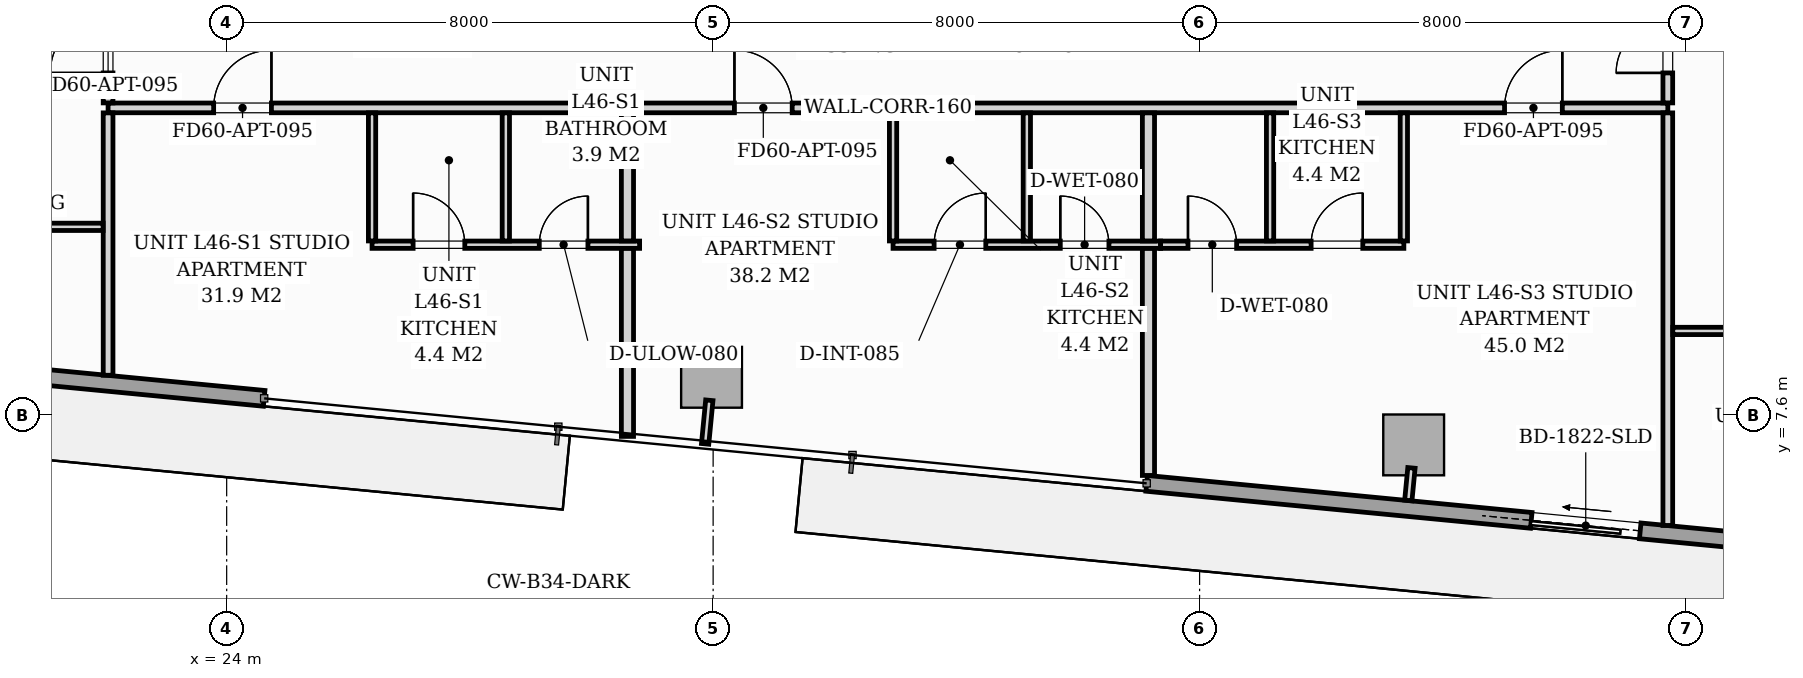
"""IFC4 building model, lengths in metres.
Left out: names, types, materials, properties, quantities, classifications, styles, units other than length and angle.
Written with IfcOpenShell. Run it as: python <this file> out.ifc"""

import sys

from ifc_helpers import new_model, si_unit, direction, frame, frame_2d, origin, origin_2d, place, context, subcontext, project, spatial, rectangle, extrude, source, transform, mapped, element, fill, save


model = new_model("IFC4")
c1 = context("Model", 3, precision=1e-05, world=origin(), true_north=direction((0.0, 1.0)))
c2 = subcontext(c1, "Body", "Model", "MODEL_VIEW")
j1 = project(units=[si_unit("LENGTHUNIT", "METRE"), si_unit("PLANEANGLEUNIT", "RADIAN")], contexts=[c1])
p1 = place(None, origin())
s1 = spatial("IfcSite", under=j1, at=p1, CompositionType="ELEMENT")
p2 = place(p1, origin())
s2 = spatial("IfcBuilding", under=s1, at=p2, CompositionType="ELEMENT")
p3 = place(p2, frame((0.0, 0.0, 159.8)))
s3 = spatial("IfcBuildingStorey", under=s2, at=p3, CompositionType="ELEMENT", Elevation=159.8)
m1 = source(origin(), c2, "Body", "SweptSolid", [
    extrude(rectangle(XDim=1.0, YDim=1.0, at=origin_2d()), origin(), (0.0, 0.0, 1.0), 3.194),
])
for number, where, z_axis, x_axis in (
    (1, (31.974, 8.22, 0.002), (0.0, 0.0, 1.0), (0.995, -0.096, 0.0)),
    (2, (43.521, 7.108, 0.002), (0.0, 0.0, 1.0), (0.995, -0.096, 0.0)),
):
    element("IfcColumn", number, at=place(p3, frame(where, z_axis=z_axis, x_axis=x_axis)), inside=s3, PredefinedType="COLUMN", context=c2, shape_type="MappedRepresentation", body=[
        mapped(m1, transform((0.0, 0.0, 0.0), scale=1.0)),
    ])
p4 = place(p3, frame((56.061, 4.845, 0.0), z_axis=(0.0, 0.0, 1.0), x_axis=(-0.995395976631, 0.095848055311, 0.0)))
e3 = element("IfcWall", 3, at=p4, inside=s3, PredefinedType="STANDARD", context=c2, shape_type="SweptSolid", body=[
    extrude(rectangle(XDim=17.01, YDim=0.26, at=frame_2d((8.505, 0.0))), origin(), (0.0, 0.0, 1.0), 2.9),
])
p5 = place(p4, frame((8.856, 0.0, 0.0)))
e4 = element("IfcOpeningElement", 4, at=p5, cuts=e3, PredefinedType="OPENING", context=c2, shape_type="SweptSolid", body=[
    extrude(rectangle(XDim=1.8, YDim=2.06, at=frame_2d((0.9, 1.03))), frame((0.0, 0.14, 0.0), z_axis=(0.0, -1.0, 0.0), x_axis=(1.0, 0.0, 0.0)), (0.0, 0.0, 1.0), 0.28),
])
p6 = place(p4, frame((2.05, 0.0, 0.65)))
e5 = element("IfcOpeningElement", 5, at=p6, cuts=e3, PredefinedType="OPENING", context=c2, shape_type="SweptSolid", body=[
    extrude(rectangle(XDim=1.6, YDim=1.5, at=frame_2d((0.8, 0.75))), frame((0.0, 0.14, 0.0), z_axis=(0.0, -1.0, 0.0), x_axis=(1.0, 0.0, 0.0)), (0.0, 0.0, 1.0), 0.28),
])
p7 = place(p3, frame((24.617, 7.873, 0.0), z_axis=(0.0, 0.0, 1.0), x_axis=(-0.995395976631, 0.095848055311, 0.0)))
e6 = element("IfcWall", 6, at=p7, inside=s3, PredefinedType="STANDARD", context=c2, shape_type="SweptSolid", body=[
    extrude(rectangle(XDim=17.01, YDim=0.26, at=frame_2d((8.505, 0.0))), origin(), (0.0, 0.0, 1.0), 2.9),
])
p8 = place(p7, frame((7.07, 0.0, 0.0)))
e7 = element("IfcOpeningElement", 7, at=p8, cuts=e6, PredefinedType="OPENING", context=c2, shape_type="SweptSolid", body=[
    extrude(rectangle(XDim=1.8, YDim=2.06, at=frame_2d((0.9, 1.03))), frame((0.0, 0.14, 0.0), z_axis=(0.0, -1.0, 0.0), x_axis=(1.0, 0.0, 0.0)), (0.0, 0.0, 1.0), 0.28),
])
p9 = place(p7, frame((9.7, 0.0, 0.65)))
e8 = element("IfcOpeningElement", 8, at=p9, cuts=e6, PredefinedType="OPENING", context=c2, shape_type="SweptSolid", body=[
    extrude(rectangle(XDim=1.6, YDim=1.5, at=frame_2d((0.8, 0.75))), frame((0.0, 0.14, 0.0), z_axis=(0.0, -1.0, 0.0), x_axis=(1.0, 0.0, 0.0)), (0.0, 0.0, 1.0), 0.28),
])
p10 = place(p3, frame((22.05, 12.65, 0.0), z_axis=(0.0, 0.0, 1.0), x_axis=(1.0, 0.0, 0.0)))
e9 = element("IfcWall", 9, at=p10, inside=s3, PredefinedType="PARTITIONING", context=c2, shape_type="SweptSolid", body=[
    extrude(rectangle(XDim=25.65, YDim=0.16, at=frame_2d((12.825, 0.0))), origin(), (0.0, 0.0, 1.0), 2.9),
])
p11 = place(p10, frame((1.736, 0.0, 0.0)))
e10 = element("IfcOpeningElement", 10, at=p11, cuts=e9, PredefinedType="OPENING", context=c2, shape_type="SweptSolid", body=[
    extrude(rectangle(XDim=0.95, YDim=2.06, at=frame_2d((0.475, 1.03))), frame((0.0, 0.09, 0.0), z_axis=(0.0, -1.0, 0.0), x_axis=(1.0, 0.0, 0.0)), (0.0, 0.0, 1.0), 0.18),
])
p12 = place(p10, frame((10.3, 0.0, 0.0)))
e11 = element("IfcOpeningElement", 11, at=p12, cuts=e9, PredefinedType="OPENING", context=c2, shape_type="SweptSolid", body=[
    extrude(rectangle(XDim=0.95, YDim=2.06, at=frame_2d((0.475, 1.03))), frame((0.0, 0.09, 0.0), z_axis=(0.0, -1.0, 0.0), x_axis=(1.0, 0.0, 0.0)), (0.0, 0.0, 1.0), 0.18),
])
p13 = place(p10, frame((22.965, 0.0, 0.0)))
e12 = element("IfcOpeningElement", 12, at=p13, cuts=e9, PredefinedType="OPENING", context=c2, shape_type="SweptSolid", body=[
    extrude(rectangle(XDim=0.95, YDim=2.06, at=frame_2d((0.475, 1.03))), frame((0.0, 0.09, 0.0), z_axis=(0.0, -1.0, 0.0), x_axis=(1.0, 0.0, 0.0)), (0.0, 0.0, 1.0), 0.18),
])
p14 = place(p3, frame((22.05, 8.253, 0.0), z_axis=(0.0, 0.0, 1.0), x_axis=(0.0, 1.0, 0.0)))
e13 = element("IfcWall", 13, at=p14, inside=s3, PredefinedType="PARTITIONING", context=c2, shape_type="SweptSolid", body=[
    extrude(rectangle(XDim=4.315, YDim=0.16, at=frame_2d((2.157, 0.0))), origin(), (0.0, 0.0, 1.0), 2.9),
])
p15 = place(p3, frame((22.05, 12.732, 0.0), z_axis=(0.0, 0.0, 1.0), x_axis=(0.0, 1.0, 0.0)))
e14 = element("IfcWall", 14, at=p15, inside=s3, PredefinedType="PARTITIONING", context=c2, shape_type="SweptSolid", body=[
    extrude(rectangle(XDim=14.685, YDim=0.16, at=frame_2d((7.343, 0.0))), origin(), (0.0, 0.0, 1.0), 2.9),
])
p16 = place(p15, frame((0.493, 0.0, 0.0)))
e15 = element("IfcOpeningElement", 15, at=p16, cuts=e14, PredefinedType="OPENING", context=c2, shape_type="SweptSolid", body=[
    extrude(rectangle(XDim=0.95, YDim=2.06, at=frame_2d((0.475, 1.03))), frame((0.0, 0.09, 0.0), z_axis=(0.0, -1.0, 0.0), x_axis=(1.0, 0.0, 0.0)), (0.0, 0.0, 1.0), 0.18),
])
p17 = place(p15, frame((6.085, 0.0, 0.0)))
e16 = element("IfcOpeningElement", 16, at=p17, cuts=e14, PredefinedType="OPENING", context=c2, shape_type="SweptSolid", body=[
    extrude(rectangle(XDim=0.95, YDim=2.06, at=frame_2d((0.475, 1.03))), frame((0.0, 0.09, 0.0), z_axis=(0.0, -1.0, 0.0), x_axis=(1.0, 0.0, 0.0)), (0.0, 0.0, 1.0), 0.18),
])
p18 = place(p3, frame((47.7, 5.783, 0.0), z_axis=(0.0, 0.0, 1.0), x_axis=(0.0, 1.0, 0.0)))
e17 = element("IfcWall", 17, at=p18, inside=s3, PredefinedType="PARTITIONING", context=c2, shape_type="SweptSolid", body=[
    extrude(rectangle(XDim=6.785, YDim=0.16, at=frame_2d((3.393, 0.0))), origin(), (0.0, 0.0, 1.0), 2.9),
])
p19 = place(p3, frame((47.7, 12.732, 0.0), z_axis=(0.0, 0.0, 1.0), x_axis=(0.0, 1.0, 0.0)))
e18 = element("IfcWall", 18, at=p19, inside=s3, PredefinedType="PARTITIONING", context=c2, shape_type="SweptSolid", body=[
    extrude(rectangle(XDim=7.918, YDim=0.16, at=frame_2d((3.959, 0.0))), origin(), (0.0, 0.0, 1.0), 2.9),
])
p20 = place(p19, frame((0.493, 0.0, 0.0)))
e19 = element("IfcOpeningElement", 19, at=p20, cuts=e18, PredefinedType="OPENING", context=c2, shape_type="SweptSolid", body=[
    extrude(rectangle(XDim=0.85, YDim=2.0, at=frame_2d((0.425, 1.0))), frame((0.0, 0.09, 0.0), z_axis=(0.0, -1.0, 0.0), x_axis=(1.0, 0.0, 0.0)), (0.0, 0.0, 1.0), 0.18),
])
p21 = place(p19, frame((6.311, 0.0, 0.0)))
e20 = element("IfcOpeningElement", 20, at=p21, cuts=e18, PredefinedType="OPENING", context=c2, shape_type="SweptSolid", body=[
    extrude(rectangle(XDim=0.95, YDim=2.06, at=frame_2d((0.475, 1.03))), frame((0.0, 0.09, 0.0), z_axis=(0.0, -1.0, 0.0), x_axis=(1.0, 0.0, 0.0)), (0.0, 0.0, 1.0), 0.18),
])
p22 = place(p3, frame((26.391, 10.4, 0.0), z_axis=(0.0, 0.0, 1.0), x_axis=(1.0, 0.0, 0.0)))
e21 = element("IfcWall", 21, at=p22, inside=s3, PredefinedType="PARTITIONING", context=c2, shape_type="SweptSolid", body=[
    extrude(rectangle(XDim=4.4, YDim=0.12, at=frame_2d((2.2, 0.0))), origin(), (0.0, 0.0, 1.0), 2.9),
])
p23 = place(p22, frame((0.675, 0.0, 0.0)))
e22 = element("IfcOpeningElement", 22, at=p23, cuts=e21, PredefinedType="OPENING", context=c2, shape_type="SweptSolid", body=[
    extrude(rectangle(XDim=0.85, YDim=2.05, at=frame_2d((0.425, 1.025))), frame((0.0, 0.07, 0.0), z_axis=(0.0, -1.0, 0.0), x_axis=(1.0, 0.0, 0.0)), (0.0, 0.0, 1.0), 0.14),
])
p24 = place(p22, frame((2.75, 0.0, 0.0)))
e23 = element("IfcOpeningElement", 23, at=p24, cuts=e21, PredefinedType="OPENING", context=c2, shape_type="SweptSolid", body=[
    extrude(rectangle(XDim=0.8, YDim=2.0, at=frame_2d((0.4, 1.0))), frame((0.0, 0.07, 0.0), z_axis=(0.0, -1.0, 0.0), x_axis=(1.0, 0.0, 0.0)), (0.0, 0.0, 1.0), 0.14),
])
for number, where, z_axis, x_axis in (
    (24, (26.391, 10.462, 0.0), (0.0, 0.0, 1.0), (0.0, 1.0, 0.0)),
    (25, (28.591, 10.462, 0.0), (0.0, 0.0, 1.0), (0.0, 1.0, 0.0)),
):
    element("IfcWall", number, at=place(p3, frame(where, z_axis=z_axis, x_axis=x_axis)), inside=s3, PredefinedType="PARTITIONING", context=c2, shape_type="SweptSolid", body=[
        extrude(rectangle(XDim=2.106, YDim=0.12, at=frame_2d((1.053, 0.0))), origin(), (0.0, 0.0, 1.0), 2.9),
    ])
p25 = place(p3, frame((30.591, 7.248, 0.0), z_axis=(0.0, 0.0, 1.0), x_axis=(0.0, 1.0, 0.0)))
e26 = element("IfcWall", 26, at=p25, inside=s3, PredefinedType="PARTITIONING", context=c2, shape_type="SweptSolid", body=[
    extrude(rectangle(XDim=3.09, YDim=0.2, at=frame_2d((1.545, 0.0))), origin(), (0.0, 0.0, 1.0), 2.9),
])
p26 = place(p3, frame((30.591, 10.462, 0.0), z_axis=(0.0, 0.0, 1.0), x_axis=(0.0, 1.0, 0.0)))
e27 = element("IfcWall", 27, at=p26, inside=s3, PredefinedType="PARTITIONING", context=c2, shape_type="SweptSolid", body=[
    extrude(rectangle(XDim=2.106, YDim=0.2, at=frame_2d((1.053, 0.0))), origin(), (0.0, 0.0, 1.0), 2.9),
])
p27 = place(p3, frame((34.959, 10.4, 0.0), z_axis=(0.0, 0.0, 1.0), x_axis=(1.0, 0.0, 0.0)))
e28 = element("IfcWall", 28, at=p27, inside=s3, PredefinedType="PARTITIONING", context=c2, shape_type="SweptSolid", body=[
    extrude(rectangle(XDim=4.4, YDim=0.12, at=frame_2d((2.2, 0.0))), origin(), (0.0, 0.0, 1.0), 2.9),
])
p28 = place(p27, frame((0.675, 0.0, 0.0)))
e29 = element("IfcOpeningElement", 29, at=p28, cuts=e28, PredefinedType="OPENING", context=c2, shape_type="SweptSolid", body=[
    extrude(rectangle(XDim=0.85, YDim=2.05, at=frame_2d((0.425, 1.025))), frame((0.0, 0.07, 0.0), z_axis=(0.0, -1.0, 0.0), x_axis=(1.0, 0.0, 0.0)), (0.0, 0.0, 1.0), 0.14),
])
p29 = place(p27, frame((2.75, 0.0, 0.0)))
e30 = element("IfcOpeningElement", 30, at=p29, cuts=e28, PredefinedType="OPENING", context=c2, shape_type="SweptSolid", body=[
    extrude(rectangle(XDim=0.8, YDim=2.02, at=frame_2d((0.4, 1.01))), frame((0.0, 0.07, 0.0), z_axis=(0.0, -1.0, 0.0), x_axis=(1.0, 0.0, 0.0)), (0.0, 0.0, 1.0), 0.14),
])
for number, where, z_axis, x_axis in (
    (31, (34.959, 10.462, 0.0), (0.0, 0.0, 1.0), (0.0, 1.0, 0.0)),
    (32, (37.159, 10.462, 0.0), (0.0, 0.0, 1.0), (0.0, 1.0, 0.0)),
):
    element("IfcWall", number, at=place(p3, frame(where, z_axis=z_axis, x_axis=x_axis)), inside=s3, PredefinedType="PARTITIONING", context=c2, shape_type="SweptSolid", body=[
        extrude(rectangle(XDim=2.106, YDim=0.12, at=frame_2d((1.053, 0.0))), origin(), (0.0, 0.0, 1.0), 2.9),
    ])
p30 = place(p3, frame((39.159, 6.606, 0.0), z_axis=(0.0, 0.0, 1.0), x_axis=(0.0, 1.0, 0.0)))
e33 = element("IfcWall", 33, at=p30, inside=s3, PredefinedType="PARTITIONING", context=c2, shape_type="SweptSolid", body=[
    extrude(rectangle(XDim=3.732, YDim=0.2, at=frame_2d((1.866, 0.0))), origin(), (0.0, 0.0, 1.0), 2.9),
])
p31 = place(p3, frame((39.159, 10.462, 0.0), z_axis=(0.0, 0.0, 1.0), x_axis=(0.0, 1.0, 0.0)))
e34 = element("IfcWall", 34, at=p31, inside=s3, PredefinedType="PARTITIONING", context=c2, shape_type="SweptSolid", body=[
    extrude(rectangle(XDim=2.106, YDim=0.2, at=frame_2d((1.053, 0.0))), origin(), (0.0, 0.0, 1.0), 2.9),
])
p32 = place(p3, frame((39.359, 10.4, 0.0), z_axis=(0.0, 0.0, 1.0), x_axis=(1.0, 0.0, 0.0)))
e35 = element("IfcWall", 35, at=p32, inside=s3, PredefinedType="PARTITIONING", context=c2, shape_type="SweptSolid", body=[
    extrude(rectangle(XDim=4.0, YDim=0.12, at=frame_2d((2.0, 0.0))), origin(), (0.0, 0.0, 1.0), 2.9),
])
p33 = place(p32, frame((0.45, 0.0, 0.0)))
e36 = element("IfcOpeningElement", 36, at=p33, cuts=e35, PredefinedType="OPENING", context=c2, shape_type="SweptSolid", body=[
    extrude(rectangle(XDim=0.8, YDim=2.02, at=frame_2d((0.4, 1.01))), frame((0.0, 0.07, 0.0), z_axis=(0.0, -1.0, 0.0), x_axis=(1.0, 0.0, 0.0)), (0.0, 0.0, 1.0), 0.14),
])
p34 = place(p32, frame((2.475, 0.0, 0.0)))
e37 = element("IfcOpeningElement", 37, at=p34, cuts=e35, PredefinedType="OPENING", context=c2, shape_type="SweptSolid", body=[
    extrude(rectangle(XDim=0.85, YDim=2.05, at=frame_2d((0.425, 1.025))), frame((0.0, 0.07, 0.0), z_axis=(0.0, -1.0, 0.0), x_axis=(1.0, 0.0, 0.0)), (0.0, 0.0, 1.0), 0.14),
])
for number, where, z_axis, x_axis in (
    (38, (43.359, 10.462, 0.0), (0.0, 0.0, 1.0), (0.0, 1.0, 0.0)),
    (39, (41.159, 10.462, 0.0), (0.0, 0.0, 1.0), (0.0, 1.0, 0.0)),
):
    element("IfcWall", number, at=place(p3, frame(where, z_axis=z_axis, x_axis=x_axis)), inside=s3, PredefinedType="PARTITIONING", context=c2, shape_type="SweptSolid", body=[
        extrude(rectangle(XDim=2.106, YDim=0.12, at=frame_2d((1.053, 0.0))), origin(), (0.0, 0.0, 1.0), 2.9),
    ])
p35 = place(p3, frame((8.751, 10.694, 0.0), z_axis=(0.0, 0.0, 1.0), x_axis=(1.0, 0.0, 0.0)))
e40 = element("IfcWall", 40, at=p35, inside=s3, PredefinedType="PARTITIONING", context=c2, shape_type="SweptSolid", body=[
    extrude(rectangle(XDim=13.217, YDim=0.12, at=frame_2d((6.608, 0.0))), origin(), (0.0, 0.0, 1.0), 2.9),
])
p36 = place(p35, frame((6.184, 0.0, 0.0)))
e41 = element("IfcOpeningElement", 41, at=p36, cuts=e40, PredefinedType="OPENING", context=c2, shape_type="SweptSolid", body=[
    extrude(rectangle(XDim=0.85, YDim=2.05, at=frame_2d((0.425, 1.025))), frame((0.0, 0.07, 0.0), z_axis=(0.0, -1.0, 0.0), x_axis=(1.0, 0.0, 0.0)), (0.0, 0.0, 1.0), 0.14),
])
p37 = place(p3, frame((47.782, 8.982, 0.0), z_axis=(0.0, 0.0, 1.0), x_axis=(1.0, 0.0, 0.0)))
e42 = element("IfcWall", 42, at=p37, inside=s3, PredefinedType="PARTITIONING", context=c2, shape_type="SweptSolid", body=[
    extrude(rectangle(XDim=8.788, YDim=0.12, at=frame_2d((4.394, 0.0))), origin(), (0.0, 0.0, 1.0), 2.9),
])
p38 = place(p37, frame((3.969, 0.0, 0.0)))
e43 = element("IfcOpeningElement", 43, at=p38, cuts=e42, PredefinedType="OPENING", context=c2, shape_type="SweptSolid", body=[
    extrude(rectangle(XDim=0.85, YDim=2.05, at=frame_2d((0.425, 1.025))), frame((0.0, 0.07, 0.0), z_axis=(0.0, -1.0, 0.0), x_axis=(1.0, 0.0, 0.0)), (0.0, 0.0, 1.0), 0.14),
])
p39 = place(p3, frame((31.938, 7.841, 0.0), z_axis=(0.0, 0.0, 1.0), x_axis=(-0.095977354523, -0.995383517755, 0.0)))
e44 = element("IfcWall", 44, at=p39, inside=s3, PredefinedType="PARTITIONING", context=c2, shape_type="SweptSolid", body=[
    extrude(rectangle(XDim=0.72, YDim=0.12, at=frame_2d((0.36, 0.0))), origin(), (0.0, 0.0, 1.0), 2.9),
])
p40 = place(p3, frame((43.484, 6.729, 0.0), z_axis=(0.0, 0.0, 1.0), x_axis=(-0.095772948675, -0.995403205893, 0.0)))
e45 = element("IfcWall", 45, at=p40, inside=s3, PredefinedType="PARTITIONING", context=c2, shape_type="SweptSolid", body=[
    extrude(rectangle(XDim=0.538, YDim=0.12, at=frame_2d((0.269, 0.0))), origin(), (0.0, 0.0, 1.0), 2.9),
])
m2 = source(origin(), c2, "Body", "SweptSolid", [
    extrude(rectangle(XDim=1.8, YDim=2.06, at=frame_2d((0.9, 1.03))), frame((0.0, 0.025, 0.0), z_axis=(0.0, -1.0, 0.0), x_axis=(1.0, 0.0, 0.0)), (0.0, 0.0, 1.0), 0.05),
])
p41 = place(p5, origin())
e46 = element("IfcDoor", 46, at=p41, inside=s3, OperationType="SLIDING_TO_RIGHT", PredefinedType="DOOR", context=c2, shape_type="MappedRepresentation", body=[
    mapped(m2, transform((0.0, 0.0, 0.0), scale=1.0)),
])
fill(e4, e46)
m3 = source(origin(), c2, "Body", "SweptSolid", [
    extrude(rectangle(XDim=0.95, YDim=2.06, at=frame_2d((0.475, 1.03))), frame((0.0, 0.025, 0.0), z_axis=(0.0, -1.0, 0.0), x_axis=(1.0, 0.0, 0.0)), (0.0, 0.0, 1.0), 0.05),
])
p42 = place(p11, origin())
e47 = element("IfcDoor", 47, at=p42, inside=s3, OperationType="SINGLE_SWING_RIGHT", PredefinedType="DOOR", context=c2, shape_type="MappedRepresentation", body=[
    mapped(m3, transform((0.0, 0.0, 0.0), scale=1.0)),
])
fill(e10, e47)
m4 = source(origin(), c2, "Body", "SweptSolid", [
    extrude(rectangle(XDim=0.85, YDim=2.05, at=frame_2d((0.425, 1.025))), frame((0.0, 0.025, 0.0), z_axis=(0.0, -1.0, 0.0), x_axis=(1.0, 0.0, 0.0)), (0.0, 0.0, 1.0), 0.05),
])
p43 = place(p23, origin())
e48 = element("IfcDoor", 48, at=p43, inside=s3, OperationType="SINGLE_SWING_LEFT", PredefinedType="DOOR", context=c2, shape_type="MappedRepresentation", body=[
    mapped(m4, transform((0.0, 0.0, 0.0), scale=1.0)),
])
fill(e22, e48)
m5 = source(origin(), c2, "Body", "SweptSolid", [
    extrude(rectangle(XDim=0.8, YDim=2.0, at=frame_2d((0.4, 1.0))), frame((0.0, 0.025, 0.0), z_axis=(0.0, -1.0, 0.0), x_axis=(1.0, 0.0, 0.0)), (0.0, 0.0, 1.0), 0.05),
])
p44 = place(p24, origin())
e49 = element("IfcDoor", 49, at=p44, inside=s3, OperationType="SINGLE_SWING_RIGHT", PredefinedType="DOOR", context=c2, shape_type="MappedRepresentation", body=[
    mapped(m5, transform((0.0, 0.0, 0.0), scale=1.0)),
])
fill(e23, e49)
p45 = place(p12, origin())
e50 = element("IfcDoor", 50, at=p45, inside=s3, OperationType="SINGLE_SWING_LEFT", PredefinedType="DOOR", context=c2, shape_type="MappedRepresentation", body=[
    mapped(m3, transform((0.0, 0.0, 0.0), scale=1.0)),
])
fill(e11, e50)
p46 = place(p28, origin())
e51 = element("IfcDoor", 51, at=p46, inside=s3, OperationType="SINGLE_SWING_RIGHT", PredefinedType="DOOR", context=c2, shape_type="MappedRepresentation", body=[
    mapped(m4, transform((0.0, 0.0, 0.0), scale=1.0)),
])
fill(e29, e51)
m6 = source(origin(), c2, "Body", "SweptSolid", [
    extrude(rectangle(XDim=0.8, YDim=2.02, at=frame_2d((0.4, 1.01))), frame((0.0, 0.025, 0.0), z_axis=(0.0, -1.0, 0.0), x_axis=(1.0, 0.0, 0.0)), (0.0, 0.0, 1.0), 0.05),
])
p47 = place(p29, origin())
e52 = element("IfcDoor", 52, at=p47, inside=s3, OperationType="SINGLE_SWING_LEFT", PredefinedType="DOOR", context=c2, shape_type="MappedRepresentation", body=[
    mapped(m6, transform((0.0, 0.0, 0.0), scale=1.0)),
])
fill(e30, e52)
p48 = place(p13, origin())
e53 = element("IfcDoor", 53, at=p48, inside=s3, OperationType="SINGLE_SWING_RIGHT", PredefinedType="DOOR", context=c2, shape_type="MappedRepresentation", body=[
    mapped(m3, transform((0.0, 0.0, 0.0), scale=1.0)),
])
fill(e12, e53)
p49 = place(p33, origin())
e54 = element("IfcDoor", 54, at=p49, inside=s3, OperationType="SINGLE_SWING_LEFT", PredefinedType="DOOR", context=c2, shape_type="MappedRepresentation", body=[
    mapped(m6, transform((0.0, 0.0, 0.0), scale=1.0)),
])
fill(e36, e54)
p50 = place(p34, origin())
e55 = element("IfcDoor", 55, at=p50, inside=s3, OperationType="SINGLE_SWING_RIGHT", PredefinedType="DOOR", context=c2, shape_type="MappedRepresentation", body=[
    mapped(m4, transform((0.0, 0.0, 0.0), scale=1.0)),
])
fill(e37, e55)
p51 = place(p16, origin())
e56 = element("IfcDoor", 56, at=p51, inside=s3, OperationType="SINGLE_SWING_LEFT", PredefinedType="DOOR", context=c2, shape_type="MappedRepresentation", body=[
    mapped(m3, transform((0.0, 0.0, 0.0), scale=1.0)),
])
fill(e15, e56)
m7 = source(origin(), c2, "Body", "SweptSolid", [
    extrude(rectangle(XDim=0.85, YDim=2.0, at=frame_2d((0.425, 1.0))), frame((0.0, 0.025, 0.0), z_axis=(0.0, -1.0, 0.0), x_axis=(1.0, 0.0, 0.0)), (0.0, 0.0, 1.0), 0.05),
])
p52 = place(p20, origin())
e57 = element("IfcDoor", 57, at=p52, inside=s3, OperationType="SINGLE_SWING_LEFT", PredefinedType="DOOR", context=c2, shape_type="MappedRepresentation", body=[
    mapped(m7, transform((0.0, 0.0, 0.0), scale=1.0)),
])
fill(e19, e57)
save(model, sys.argv[1])
